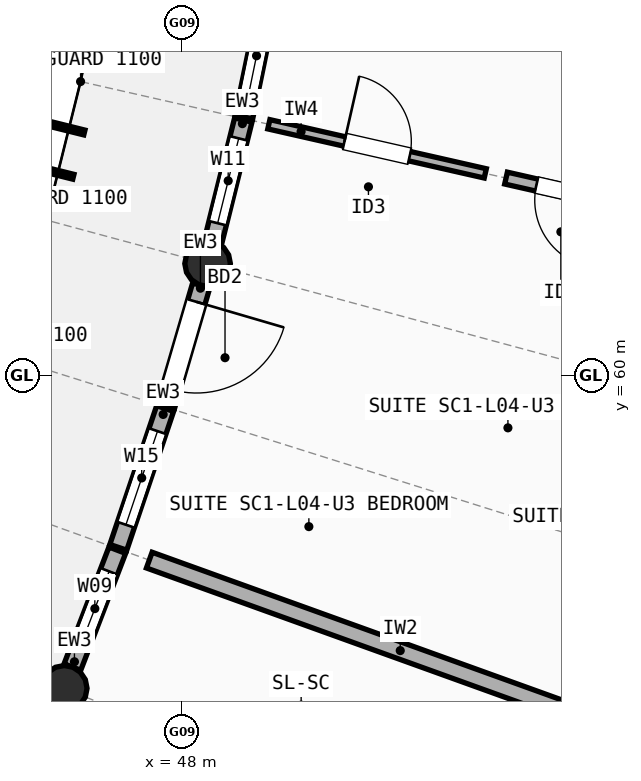
"""IFC4 building model, lengths in metres.
Left out: names, types, materials, properties, quantities, classifications, styles, units other than length and angle.
Written with IfcOpenShell. Run it as: python <this file> out.ifc"""

import sys

from ifc_helpers import new_model, si_unit, direction, frame, frame_2d, origin, origin_2d, place, context, subcontext, project, spatial, rectangle, circle, extrude, element, fill, save


model = new_model("IFC4")
c1 = context("Model", 3, precision=1e-05, world=origin(), true_north=direction((0.0, 1.0)))
c2 = subcontext(c1, "Body", "Model", "MODEL_VIEW")
j1 = project(units=[si_unit("LENGTHUNIT", "METRE"), si_unit("PLANEANGLEUNIT", "RADIAN")], contexts=[c1])
p1 = place(None, origin())
s1 = spatial("IfcSite", under=j1, at=p1, CompositionType="ELEMENT")
p2 = place(p1, origin())
s2 = spatial("IfcBuilding", under=s1, at=p2, CompositionType="ELEMENT")
p3 = place(p2, frame((0.0, 0.0, 14.1)))
s3 = spatial("IfcBuildingStorey", under=s2, at=p3, CompositionType="ELEMENT", Elevation=14.1)
for number, where, z_axis, x_axis in (
    (1, (46.45, 55.884, 0.0), (0.0, 0.0, 1.0), (1.0, 0.0, 0.0)),
    (2, (48.336, 61.471, 0.0), (0.0, 0.0, 1.0), (1.0, 0.0, 0.0)),
):
    element("IfcColumn", number, at=place(p3, frame(where, z_axis=z_axis, x_axis=x_axis)), inside=s3, PredefinedType="COLUMN", context=c2, shape_type="SweptSolid", body=[
        extrude(circle(Radius=0.3, at=origin_2d()), origin(), (0.0, 0.0, 1.0), 2.948),
    ])
p4 = place(p3, frame((46.558, 56.164, 0.0), z_axis=(0.0, 0.0, 1.0), x_axis=(0.358343161541, 0.933589941343, 0.0)))
e3 = element("IfcWall", 3, at=p4, inside=s3, PredefinedType="STANDARD", context=c2, shape_type="SweptSolid", body=[
    extrude(rectangle(XDim=1.647, YDim=0.235, at=frame_2d((0.823, 0.0))), origin(), (0.0, 0.0, 1.0), 2.684),
])
p5 = place(p4, frame((0.298, 0.0, 0.85)))
e4 = element("IfcOpeningElement", 4, at=p5, cuts=e3, PredefinedType="OPENING", context=c2, shape_type="SweptSolid", body=[
    extrude(rectangle(XDim=1.05, YDim=1.35, at=frame_2d((0.525, 0.675))), frame((0.0, 0.127, 0.0), z_axis=(0.0, -1.0, 0.0), x_axis=(1.0, 0.0, 0.0)), (0.0, 0.0, 1.0), 0.255),
])
p6 = place(p3, frame((47.161, 57.739, 0.0), z_axis=(0.0, 0.0, 1.0), x_axis=(0.319798549746, 0.947485560618, 0.0)))
e5 = element("IfcWall", 5, at=p6, inside=s3, PredefinedType="STANDARD", context=c2, shape_type="SweptSolid", body=[
    extrude(rectangle(XDim=1.927, YDim=0.235, at=frame_2d((0.963, 0.0))), origin(), (0.0, 0.0, 1.0), 2.684),
])
p7 = place(p6, frame((0.313, 0.0, 0.85)))
e6 = element("IfcOpeningElement", 6, at=p7, cuts=e5, PredefinedType="OPENING", context=c2, shape_type="SweptSolid", body=[
    extrude(rectangle(XDim=1.3, YDim=1.45, at=frame_2d((0.65, 0.725))), frame((0.0, 0.127, 0.0), z_axis=(0.0, -1.0, 0.0), x_axis=(1.0, 0.0, 0.0)), (0.0, 0.0, 1.0), 0.255),
])
p8 = place(p3, frame((47.79, 59.603, 0.0), z_axis=(0.0, 0.0, 1.0), x_axis=(0.280648942253, 0.959810487134, 0.0)))
e7 = element("IfcWall", 7, at=p8, inside=s3, PredefinedType="STANDARD", context=c2, shape_type="SweptSolid", body=[
    extrude(rectangle(XDim=1.647, YDim=0.235, at=frame_2d((0.823, 0.0))), origin(), (0.0, 0.0, 1.0), 2.684),
])
p9 = place(p8, frame((0.223, 0.0, 0.0)))
e8 = element("IfcOpeningElement", 8, at=p9, cuts=e7, PredefinedType="OPENING", context=c2, shape_type="SweptSolid", body=[
    extrude(rectangle(XDim=1.2, YDim=2.15, at=frame_2d((0.6, 1.075))), frame((0.0, 0.127, 0.0), z_axis=(0.0, -1.0, 0.0), x_axis=(1.0, 0.0, 0.0)), (0.0, 0.0, 1.0), 0.255),
])
p10 = place(p3, frame((48.408, 61.762, 0.0), z_axis=(0.0, 0.0, 1.0), x_axis=(0.241175130643, 0.970481610521, 0.0)))
e9 = element("IfcWall", 9, at=p10, inside=s3, PredefinedType="STANDARD", context=c2, shape_type="SweptSolid", body=[
    extrude(rectangle(XDim=1.647, YDim=0.235, at=frame_2d((0.823, 0.0))), origin(), (0.0, 0.0, 1.0), 2.684),
])
p11 = place(p10, frame((0.248, 0.0, 0.85)))
e10 = element("IfcOpeningElement", 10, at=p11, cuts=e9, PredefinedType="OPENING", context=c2, shape_type="SweptSolid", body=[
    extrude(rectangle(XDim=1.15, YDim=1.45, at=frame_2d((0.575, 0.725))), frame((0.0, 0.127, 0.0), z_axis=(0.0, -1.0, 0.0), x_axis=(1.0, 0.0, 0.0)), (0.0, 0.0, 1.0), 0.255),
])
p12 = place(p3, frame((48.814, 63.399, 0.0), z_axis=(0.0, 0.0, 1.0), x_axis=(0.201188555682, 0.97955253308, 0.0)))
e11 = element("IfcWall", 11, at=p12, inside=s3, PredefinedType="STANDARD", context=c2, shape_type="SweptSolid", body=[
    extrude(rectangle(XDim=1.647, YDim=0.235, at=frame_2d((0.823, 0.0))), origin(), (0.0, 0.0, 1.0), 2.684),
])
p13 = place(p12, frame((0.223, 0.0, 0.85)))
e12 = element("IfcOpeningElement", 12, at=p13, cuts=e11, PredefinedType="OPENING", context=c2, shape_type="SweptSolid", body=[
    extrude(rectangle(XDim=1.2, YDim=1.35, at=frame_2d((0.6, 0.675))), frame((0.0, 0.127, 0.0), z_axis=(0.0, -1.0, 0.0), x_axis=(1.0, 0.0, 0.0)), (0.0, 0.0, 1.0), 0.255),
])
p14 = place(p3, frame((47.569, 57.571, 0.0), z_axis=(0.0, 0.0, 1.0), x_axis=(0.940728143869, -0.339161553441, 0.0)))
e13 = element("IfcWall", 13, at=p14, inside=s3, PredefinedType="SOLIDWALL", context=c2, shape_type="SweptSolid", body=[
    extrude(rectangle(XDim=7.02, YDim=0.22, at=frame_2d((3.51, 0.0))), origin(), (0.0, 0.0, 1.0), 2.742),
])
p15 = place(p3, frame((49.142, 63.305, 0.0), z_axis=(0.0, 0.0, 1.0), x_axis=(0.975217386735, -0.221248838661, 0.0)))
e14 = element("IfcWall", 14, at=p15, inside=s3, PredefinedType="PARTITIONING", context=c2, shape_type="SweptSolid", body=[
    extrude(rectangle(XDim=2.92, YDim=0.125, at=frame_2d((1.46, 0.0))), origin(), (0.0, 0.0, 1.0), 2.742),
])
p16 = place(p15, frame((1.02, 0.0, 0.0)))
e15 = element("IfcOpeningElement", 15, at=p16, cuts=e14, PredefinedType="OPENING", context=c2, shape_type="SweptSolid", body=[
    extrude(rectangle(XDim=0.88, YDim=2.1, at=frame_2d((0.44, 1.05))), frame((0.0, 0.073, 0.0), z_axis=(0.0, -1.0, 0.0), x_axis=(1.0, 0.0, 0.0)), (0.0, 0.0, 1.0), 0.145),
])
p17 = place(p3, frame((52.263, 62.597, 0.0), z_axis=(0.0, 0.0, 1.0), x_axis=(0.97521226366, -0.221271418868, 0.0)))
e16 = element("IfcWall", 16, at=p17, inside=s3, PredefinedType="PLUMBINGWALL", context=c2, shape_type="SweptSolid", body=[
    extrude(rectangle(XDim=1.72, YDim=0.16, at=frame_2d((0.86, 0.0))), origin(), (0.0, 0.0, 1.0), 2.742),
])
p18 = place(p17, frame((0.41, 0.0, 0.0)))
e17 = element("IfcOpeningElement", 17, at=p18, cuts=e16, PredefinedType="OPENING", context=c2, shape_type="SweptSolid", body=[
    extrude(rectangle(XDim=0.9, YDim=2.1, at=frame_2d((0.45, 1.05))), frame((0.0, 0.09, 0.0), z_axis=(0.0, -1.0, 0.0), x_axis=(1.0, 0.0, 0.0)), (0.0, 0.0, 1.0), 0.18),
])
p19 = place(p5, origin())
e18 = element("IfcWindow", 18, at=p19, inside=s3, PartitioningType="SINGLE_PANEL", PredefinedType="WINDOW", context=c2, shape_type="SweptSolid", body=[
    extrude(rectangle(XDim=1.05, YDim=1.35, at=frame_2d((0.525, 0.675))), frame((0.0, 0.03, 0.0), z_axis=(0.0, -1.0, 0.0), x_axis=(1.0, 0.0, 0.0)), (0.0, 0.0, 1.0), 0.06),
])
fill(e4, e18)
p20 = place(p7, origin())
e19 = element("IfcWindow", 19, at=p20, inside=s3, PartitioningType="SINGLE_PANEL", PredefinedType="WINDOW", context=c2, shape_type="SweptSolid", body=[
    extrude(rectangle(XDim=1.3, YDim=1.45, at=frame_2d((0.65, 0.725))), frame((0.0, 0.03, 0.0), z_axis=(0.0, -1.0, 0.0), x_axis=(1.0, 0.0, 0.0)), (0.0, 0.0, 1.0), 0.06),
])
fill(e6, e19)
p21 = place(p9, origin())
e20 = element("IfcDoor", 20, at=p21, inside=s3, OperationType="SINGLE_SWING_RIGHT", PredefinedType="DOOR", context=c2, shape_type="SweptSolid", body=[
    extrude(rectangle(XDim=1.2, YDim=2.15, at=frame_2d((0.6, 1.075))), frame((0.0, 0.025, 0.0), z_axis=(0.0, -1.0, 0.0), x_axis=(1.0, 0.0, 0.0)), (0.0, 0.0, 1.0), 0.05),
])
fill(e8, e20)
p22 = place(p11, origin())
e21 = element("IfcWindow", 21, at=p22, inside=s3, PartitioningType="SINGLE_PANEL", PredefinedType="WINDOW", context=c2, shape_type="SweptSolid", body=[
    extrude(rectangle(XDim=1.15, YDim=1.45, at=frame_2d((0.575, 0.725))), frame((0.0, 0.03, 0.0), z_axis=(0.0, -1.0, 0.0), x_axis=(1.0, 0.0, 0.0)), (0.0, 0.0, 1.0), 0.06),
])
fill(e10, e21)
p23 = place(p13, origin())
e22 = element("IfcWindow", 22, at=p23, inside=s3, PartitioningType="SINGLE_PANEL", PredefinedType="WINDOW", context=c2, shape_type="SweptSolid", body=[
    extrude(rectangle(XDim=1.2, YDim=1.35, at=frame_2d((0.6, 0.675))), frame((0.0, 0.03, 0.0), z_axis=(0.0, -1.0, 0.0), x_axis=(1.0, 0.0, 0.0)), (0.0, 0.0, 1.0), 0.06),
])
fill(e12, e22)
p24 = place(p16, origin())
e23 = element("IfcDoor", 23, at=p24, inside=s3, OperationType="SINGLE_SWING_LEFT", PredefinedType="DOOR", context=c2, shape_type="SweptSolid", body=[
    extrude(rectangle(XDim=0.88, YDim=2.1, at=frame_2d((0.44, 1.05))), frame((0.0, 0.025, 0.0), z_axis=(0.0, -1.0, 0.0), x_axis=(1.0, 0.0, 0.0)), (0.0, 0.0, 1.0), 0.05),
])
fill(e15, e23)
p25 = place(p18, origin())
e24 = element("IfcDoor", 24, at=p25, inside=s3, OperationType="SINGLE_SWING_RIGHT", PredefinedType="DOOR", context=c2, shape_type="SweptSolid", body=[
    extrude(rectangle(XDim=0.9, YDim=2.1, at=frame_2d((0.45, 1.05))), frame((0.0, 0.025, 0.0), z_axis=(0.0, -1.0, 0.0), x_axis=(1.0, 0.0, 0.0)), (0.0, 0.0, 1.0), 0.05),
])
fill(e17, e24)
save(model, sys.argv[1])
